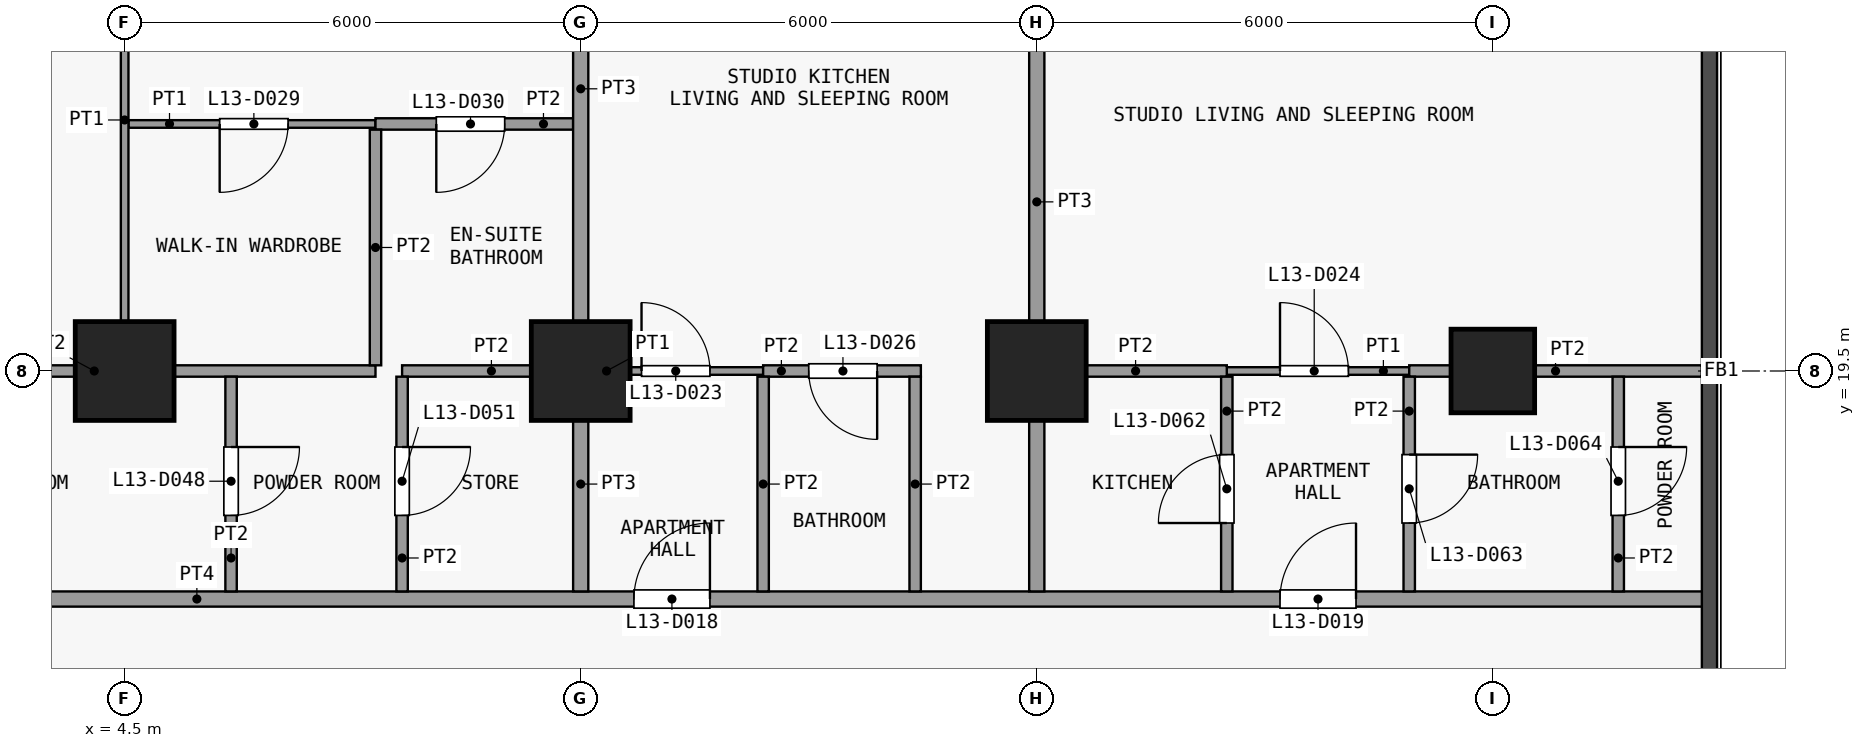
"""IFC4 building model, lengths in metres.
Left out: names, types, materials, properties, quantities, classifications, styles, units other than length and angle.
Written with IfcOpenShell. Run it as: python <this file> out.ifc"""

import sys

from ifc_helpers import new_model, si_unit, direction, frame, frame_2d, origin, origin_2d, place, context, subcontext, project, spatial, rectangle, extrude, element, fill, save


model = new_model("IFC4")
c1 = context("Model", 3, precision=1e-05, world=origin(), true_north=direction((0.0, 1.0)))
c2 = subcontext(c1, "Body", "Model", "MODEL_VIEW")
j1 = project(units=[si_unit("LENGTHUNIT", "METRE"), si_unit("PLANEANGLEUNIT", "RADIAN")], contexts=[c1])
p1 = place(None, origin())
s1 = spatial("IfcSite", under=j1, at=p1, CompositionType="ELEMENT")
p2 = place(p1, origin())
s2 = spatial("IfcBuilding", under=s1, at=p2, CompositionType="ELEMENT")
p3 = place(p2, frame((0.0, 0.0, 57.7)))
s3 = spatial("IfcBuildingStorey", under=s2, at=p3, CompositionType="ELEMENT", Elevation=57.7)
for number, where, z_axis, x_axis in (
    (1, (4.5, 19.5, 0.0), (0.0, 0.0, 1.0), (1.0, 0.0, 0.0)),
    (2, (10.5, 19.5, 0.0), (0.0, 0.0, 1.0), (1.0, 0.0, 0.0)),
    (3, (16.5, 19.5, 0.0), (0.0, 0.0, 1.0), (1.0, 0.0, 0.0)),
):
    element("IfcColumn", number, at=place(p3, frame(where, z_axis=z_axis, x_axis=x_axis)), inside=s3, PredefinedType="COLUMN", context=c2, shape_type="SweptSolid", body=[
        extrude(rectangle(XDim=1.3, YDim=1.3, at=origin_2d()), origin(), (0.0, 0.0, 1.0), 3.6),
    ])
p4 = place(p3, frame((22.5, 19.5, 0.0), z_axis=(0.0, 0.0, 1.0), x_axis=(1.0, 0.0, 0.0)))
e4 = element("IfcColumn", 4, at=p4, inside=s3, PredefinedType="COLUMN", context=c2, shape_type="SweptSolid", body=[
    extrude(rectangle(XDim=1.1, YDim=1.1, at=origin_2d()), origin(), (0.0, 0.0, 1.0), 3.6),
])
p5 = place(p3, frame((-25.35, 16.5, 0.0), z_axis=(0.0, 0.0, 1.0), x_axis=(1.0, 0.0, 0.0)))
e5 = element("IfcWall", 5, at=p5, inside=s3, PredefinedType="PARTITIONING", context=c2, shape_type="SweptSolid", body=[
    extrude(rectangle(XDim=50.7, YDim=0.2, at=frame_2d((25.35, 0.0))), origin(), (0.0, 0.0, 1.0), 3.3),
])
p6 = place(p5, frame((7.05, 0.0, 0.0)))
e6 = element("IfcOpeningElement", 6, at=p6, cuts=e5, PredefinedType="OPENING", context=c2, shape_type="SweptSolid", body=[
    extrude(rectangle(XDim=1.0, YDim=2.1, at=frame_2d((0.5, 1.05))), frame((0.0, 0.11, 0.0), z_axis=(0.0, -1.0, 0.0), x_axis=(1.0, 0.0, 0.0)), (0.0, 0.0, 1.0), 0.22),
])
p7 = place(p5, frame((15.55, 0.0, 0.0)))
e7 = element("IfcOpeningElement", 7, at=p7, cuts=e5, PredefinedType="OPENING", context=c2, shape_type="SweptSolid", body=[
    extrude(rectangle(XDim=1.0, YDim=2.1, at=frame_2d((0.5, 1.05))), frame((0.0, 0.11, 0.0), z_axis=(0.0, -1.0, 0.0), x_axis=(1.0, 0.0, 0.0)), (0.0, 0.0, 1.0), 0.22),
])
p8 = place(p5, frame((24.05, 0.0, 0.0)))
e8 = element("IfcOpeningElement", 8, at=p8, cuts=e5, PredefinedType="OPENING", context=c2, shape_type="SweptSolid", body=[
    extrude(rectangle(XDim=1.0, YDim=2.1, at=frame_2d((0.5, 1.05))), frame((0.0, 0.11, 0.0), z_axis=(0.0, -1.0, 0.0), x_axis=(1.0, 0.0, 0.0)), (0.0, 0.0, 1.0), 0.22),
])
p9 = place(p5, frame((36.55, 0.0, 0.0)))
e9 = element("IfcOpeningElement", 9, at=p9, cuts=e5, PredefinedType="OPENING", context=c2, shape_type="SweptSolid", body=[
    extrude(rectangle(XDim=1.0, YDim=2.1, at=frame_2d((0.5, 1.05))), frame((0.0, 0.11, 0.0), z_axis=(0.0, -1.0, 0.0), x_axis=(1.0, 0.0, 0.0)), (0.0, 0.0, 1.0), 0.22),
])
p10 = place(p5, frame((45.05, 0.0, 0.0)))
e10 = element("IfcOpeningElement", 10, at=p10, cuts=e5, PredefinedType="OPENING", context=c2, shape_type="SweptSolid", body=[
    extrude(rectangle(XDim=1.0, YDim=2.1, at=frame_2d((0.5, 1.05))), frame((0.0, 0.11, 0.0), z_axis=(0.0, -1.0, 0.0), x_axis=(1.0, 0.0, 0.0)), (0.0, 0.0, 1.0), 0.22),
])
p11 = place(p3, frame((10.5, 19.5, 0.0), z_axis=(0.0, 0.0, 1.0), x_axis=(1.0, 0.0, 0.0)))
e11 = element("IfcWall", 11, at=p11, inside=s3, PredefinedType="PARTITIONING", context=c2, shape_type="SweptSolid", body=[
    extrude(rectangle(XDim=2.4, YDim=0.1, at=frame_2d((1.2, 0.0))), origin(), (0.0, 0.0, 1.0), 3.3),
])
p12 = place(p11, frame((0.8, 0.0, 0.0)))
e12 = element("IfcOpeningElement", 12, at=p12, cuts=e11, PredefinedType="OPENING", context=c2, shape_type="SweptSolid", body=[
    extrude(rectangle(XDim=0.9, YDim=2.1, at=frame_2d((0.45, 1.05))), frame((0.0, 0.06, 0.0), z_axis=(0.0, -1.0, 0.0), x_axis=(1.0, 0.0, 0.0)), (0.0, 0.0, 1.0), 0.12),
])
p13 = place(p3, frame((19.0, 19.5, 0.0), z_axis=(0.0, 0.0, 1.0), x_axis=(1.0, 0.0, 0.0)))
e13 = element("IfcWall", 13, at=p13, inside=s3, PredefinedType="PARTITIONING", context=c2, shape_type="SweptSolid", body=[
    extrude(rectangle(XDim=2.4, YDim=0.1, at=frame_2d((1.2, 0.0))), origin(), (0.0, 0.0, 1.0), 3.3),
])
p14 = place(p13, frame((0.7, 0.0, 0.0)))
e14 = element("IfcOpeningElement", 14, at=p14, cuts=e13, PredefinedType="OPENING", context=c2, shape_type="SweptSolid", body=[
    extrude(rectangle(XDim=0.9, YDim=2.1, at=frame_2d((0.45, 1.05))), frame((0.0, 0.06, 0.0), z_axis=(0.0, -1.0, 0.0), x_axis=(1.0, 0.0, 0.0)), (0.0, 0.0, 1.0), 0.12),
])
p15 = place(p3, frame((0.4, 19.5, 0.0), z_axis=(0.0, 0.0, 1.0), x_axis=(1.0, 0.0, 0.0)))
e15 = element("IfcWall", 15, at=p15, inside=s3, PredefinedType="PARTITIONING", context=c2, shape_type="SweptSolid", body=[
    extrude(rectangle(XDim=7.4, YDim=0.15, at=frame_2d((3.7, 0.0))), origin(), (0.0, 0.0, 1.0), 3.3),
])
p16 = place(p3, frame((8.15, 19.5, 0.0), z_axis=(0.0, 0.0, 1.0), x_axis=(1.0, 0.0, 0.0)))
e16 = element("IfcWall", 16, at=p16, inside=s3, PredefinedType="PARTITIONING", context=c2, shape_type="SweptSolid", body=[
    extrude(rectangle(XDim=2.35, YDim=0.15, at=frame_2d((1.175, 0.0))), origin(), (0.0, 0.0, 1.0), 3.3),
])
p17 = place(p3, frame((12.9, 19.5, 0.0), z_axis=(0.0, 0.0, 1.0), x_axis=(1.0, 0.0, 0.0)))
e17 = element("IfcWall", 17, at=p17, inside=s3, PredefinedType="PARTITIONING", context=c2, shape_type="SweptSolid", body=[
    extrude(rectangle(XDim=2.075, YDim=0.15, at=frame_2d((1.038, 0.0))), origin(), (0.0, 0.0, 1.0), 3.3),
])
p18 = place(p17, frame((0.6, 0.0, 0.0)))
e18 = element("IfcOpeningElement", 18, at=p18, cuts=e17, PredefinedType="OPENING", context=c2, shape_type="SweptSolid", body=[
    extrude(rectangle(XDim=0.9, YDim=2.1, at=frame_2d((0.45, 1.05))), frame((0.0, 0.085, 0.0), z_axis=(0.0, -1.0, 0.0), x_axis=(1.0, 0.0, 0.0)), (0.0, 0.0, 1.0), 0.17),
])
p19 = place(p3, frame((16.6, 19.5, 0.0), z_axis=(0.0, 0.0, 1.0), x_axis=(1.0, 0.0, 0.0)))
e19 = element("IfcWall", 19, at=p19, inside=s3, PredefinedType="PARTITIONING", context=c2, shape_type="SweptSolid", body=[
    extrude(rectangle(XDim=2.4, YDim=0.15, at=frame_2d((1.2, 0.0))), origin(), (0.0, 0.0, 1.0), 3.3),
])
p20 = place(p3, frame((21.4, 19.5, 0.0), z_axis=(0.0, 0.0, 1.0), x_axis=(1.0, 0.0, 0.0)))
e20 = element("IfcWall", 20, at=p20, inside=s3, PredefinedType="PARTITIONING", context=c2, shape_type="SweptSolid", body=[
    extrude(rectangle(XDim=3.85, YDim=0.15, at=frame_2d((1.925, 0.0))), origin(), (0.0, 0.0, 1.0), 3.3),
])
p21 = place(p3, frame((4.55, 22.75, 0.0), z_axis=(0.0, 0.0, 1.0), x_axis=(1.0, 0.0, 0.0)))
e21 = element("IfcWall", 21, at=p21, inside=s3, PredefinedType="PARTITIONING", context=c2, shape_type="SweptSolid", body=[
    extrude(rectangle(XDim=3.25, YDim=0.1, at=frame_2d((1.625, 0.0))), origin(), (0.0, 0.0, 1.0), 3.3),
])
p22 = place(p21, frame((1.2, 0.0, 0.0)))
e22 = element("IfcOpeningElement", 22, at=p22, cuts=e21, PredefinedType="OPENING", context=c2, shape_type="SweptSolid", body=[
    extrude(rectangle(XDim=0.9, YDim=2.1, at=frame_2d((0.45, 1.05))), frame((0.0, 0.06, 0.0), z_axis=(0.0, -1.0, 0.0), x_axis=(1.0, 0.0, 0.0)), (0.0, 0.0, 1.0), 0.12),
])
p23 = place(p3, frame((7.8, 22.75, 0.0), z_axis=(0.0, 0.0, 1.0), x_axis=(1.0, 0.0, 0.0)))
e23 = element("IfcWall", 23, at=p23, inside=s3, PredefinedType="PARTITIONING", context=c2, shape_type="SweptSolid", body=[
    extrude(rectangle(XDim=2.6, YDim=0.15, at=frame_2d((1.3, 0.0))), origin(), (0.0, 0.0, 1.0), 3.3),
])
p24 = place(p23, frame((0.8, 0.0, 0.0)))
e24 = element("IfcOpeningElement", 24, at=p24, cuts=e23, PredefinedType="OPENING", context=c2, shape_type="SweptSolid", body=[
    extrude(rectangle(XDim=0.9, YDim=2.1, at=frame_2d((0.45, 1.05))), frame((0.0, 0.085, 0.0), z_axis=(0.0, -1.0, 0.0), x_axis=(1.0, 0.0, 0.0)), (0.0, 0.0, 1.0), 0.17),
])
p25 = place(p3, frame((4.5, 19.575, 0.0), z_axis=(0.0, 0.0, 1.0), x_axis=(0.0, 1.0, 0.0)))
e25 = element("IfcWall", 25, at=p25, inside=s3, PredefinedType="PARTITIONING", context=c2, shape_type="SweptSolid", body=[
    extrude(rectangle(XDim=8.675, YDim=0.1, at=frame_2d((4.337, 0.0))), origin(), (0.0, 0.0, 1.0), 3.3),
])
p26 = place(p25, frame((6.575, 0.0, 0.0)))
e26 = element("IfcOpeningElement", 26, at=p26, cuts=e25, PredefinedType="OPENING", context=c2, shape_type="SweptSolid", body=[
    extrude(rectangle(XDim=0.9, YDim=2.1, at=frame_2d((0.45, 1.05))), frame((0.0, 0.06, 0.0), z_axis=(0.0, -1.0, 0.0), x_axis=(1.0, 0.0, 0.0)), (0.0, 0.0, 1.0), 0.12),
])
p27 = place(p3, frame((5.9, 16.6, 0.0), z_axis=(0.0, 0.0, 1.0), x_axis=(0.0, 1.0, 0.0)))
e27 = element("IfcWall", 27, at=p27, inside=s3, PredefinedType="PARTITIONING", context=c2, shape_type="SweptSolid", body=[
    extrude(rectangle(XDim=2.825, YDim=0.15, at=frame_2d((1.413, 0.0))), origin(), (0.0, 0.0, 1.0), 3.3),
])
p28 = place(p27, frame((1.0, 0.0, 0.0)))
e28 = element("IfcOpeningElement", 28, at=p28, cuts=e27, PredefinedType="OPENING", context=c2, shape_type="SweptSolid", body=[
    extrude(rectangle(XDim=0.9, YDim=2.1, at=frame_2d((0.45, 1.05))), frame((0.0, 0.085, 0.0), z_axis=(0.0, -1.0, 0.0), x_axis=(1.0, 0.0, 0.0)), (0.0, 0.0, 1.0), 0.17),
])
p29 = place(p3, frame((7.8, 19.575, 0.0), z_axis=(0.0, 0.0, 1.0), x_axis=(0.0, 1.0, 0.0)))
e29 = element("IfcWall", 29, at=p29, inside=s3, PredefinedType="PARTITIONING", context=c2, shape_type="SweptSolid", body=[
    extrude(rectangle(XDim=3.1, YDim=0.15, at=frame_2d((1.55, 0.0))), origin(), (0.0, 0.0, 1.0), 3.3),
])
p30 = place(p3, frame((8.15, 16.6, 0.0), z_axis=(0.0, 0.0, 1.0), x_axis=(0.0, 1.0, 0.0)))
e30 = element("IfcWall", 30, at=p30, inside=s3, PredefinedType="PARTITIONING", context=c2, shape_type="SweptSolid", body=[
    extrude(rectangle(XDim=2.825, YDim=0.15, at=frame_2d((1.413, 0.0))), origin(), (0.0, 0.0, 1.0), 3.3),
])
p31 = place(p30, frame((1.0, 0.0, 0.0)))
e31 = element("IfcOpeningElement", 31, at=p31, cuts=e30, PredefinedType="OPENING", context=c2, shape_type="SweptSolid", body=[
    extrude(rectangle(XDim=0.9, YDim=2.1, at=frame_2d((0.45, 1.05))), frame((0.0, 0.085, 0.0), z_axis=(0.0, -1.0, 0.0), x_axis=(1.0, 0.0, 0.0)), (0.0, 0.0, 1.0), 0.17),
])
p32 = place(p3, frame((10.5, 16.6, 0.0), z_axis=(0.0, 0.0, 1.0), x_axis=(0.0, 1.0, 0.0)))
e32 = element("IfcWall", 32, at=p32, inside=s3, PredefinedType="PARTITIONING", context=c2, shape_type="SweptSolid", body=[
    extrude(rectangle(XDim=2.825, YDim=0.2, at=frame_2d((1.413, 0.0))), origin(), (0.0, 0.0, 1.0), 3.3),
])
p33 = place(p3, frame((10.5, 19.575, 0.0), z_axis=(0.0, 0.0, 1.0), x_axis=(0.0, 1.0, 0.0)))
e33 = element("IfcWall", 33, at=p33, inside=s3, PredefinedType="PARTITIONING", context=c2, shape_type="SweptSolid", body=[
    extrude(rectangle(XDim=7.275, YDim=0.2, at=frame_2d((3.638, 0.0))), origin(), (0.0, 0.0, 1.0), 3.3),
])
for number, where, z_axis, x_axis in (
    (34, (12.9, 16.6, 0.0), (0.0, 0.0, 1.0), (0.0, 1.0, 0.0)),
    (35, (14.9, 16.6, 0.0), (0.0, 0.0, 1.0), (0.0, 1.0, 0.0)),
):
    element("IfcWall", number, at=place(p3, frame(where, z_axis=z_axis, x_axis=x_axis)), inside=s3, PredefinedType="PARTITIONING", context=c2, shape_type="SweptSolid", body=[
        extrude(rectangle(XDim=2.825, YDim=0.15, at=frame_2d((1.413, 0.0))), origin(), (0.0, 0.0, 1.0), 3.3),
    ])
p34 = place(p3, frame((16.5, 16.6, 0.0), z_axis=(0.0, 0.0, 1.0), x_axis=(0.0, 1.0, 0.0)))
e36 = element("IfcWall", 36, at=p34, inside=s3, PredefinedType="PARTITIONING", context=c2, shape_type="SweptSolid", body=[
    extrude(rectangle(XDim=10.25, YDim=0.2, at=frame_2d((5.125, 0.0))), origin(), (0.0, 0.0, 1.0), 3.3),
])
p35 = place(p3, frame((19.0, 16.6, 0.0), z_axis=(0.0, 0.0, 1.0), x_axis=(0.0, 1.0, 0.0)))
e37 = element("IfcWall", 37, at=p35, inside=s3, PredefinedType="PARTITIONING", context=c2, shape_type="SweptSolid", body=[
    extrude(rectangle(XDim=2.825, YDim=0.15, at=frame_2d((1.413, 0.0))), origin(), (0.0, 0.0, 1.0), 3.3),
])
p36 = place(p35, frame((0.9, 0.0, 0.0)))
e38 = element("IfcOpeningElement", 38, at=p36, cuts=e37, PredefinedType="OPENING", context=c2, shape_type="SweptSolid", body=[
    extrude(rectangle(XDim=0.9, YDim=2.1, at=frame_2d((0.45, 1.05))), frame((0.0, 0.085, 0.0), z_axis=(0.0, -1.0, 0.0), x_axis=(1.0, 0.0, 0.0)), (0.0, 0.0, 1.0), 0.17),
])
p37 = place(p3, frame((21.4, 16.6, 0.0), z_axis=(0.0, 0.0, 1.0), x_axis=(0.0, 1.0, 0.0)))
e39 = element("IfcWall", 39, at=p37, inside=s3, PredefinedType="PARTITIONING", context=c2, shape_type="SweptSolid", body=[
    extrude(rectangle(XDim=2.825, YDim=0.15, at=frame_2d((1.413, 0.0))), origin(), (0.0, 0.0, 1.0), 3.3),
])
p38 = place(p37, frame((0.9, 0.0, 0.0)))
e40 = element("IfcOpeningElement", 40, at=p38, cuts=e39, PredefinedType="OPENING", context=c2, shape_type="SweptSolid", body=[
    extrude(rectangle(XDim=0.9, YDim=2.1, at=frame_2d((0.45, 1.05))), frame((0.0, 0.085, 0.0), z_axis=(0.0, -1.0, 0.0), x_axis=(1.0, 0.0, 0.0)), (0.0, 0.0, 1.0), 0.17),
])
p39 = place(p3, frame((24.15, 16.6, 0.0), z_axis=(0.0, 0.0, 1.0), x_axis=(0.0, 1.0, 0.0)))
e41 = element("IfcWall", 41, at=p39, inside=s3, PredefinedType="PARTITIONING", context=c2, shape_type="SweptSolid", body=[
    extrude(rectangle(XDim=2.825, YDim=0.15, at=frame_2d((1.413, 0.0))), origin(), (0.0, 0.0, 1.0), 3.3),
])
p40 = place(p39, frame((1.0, 0.0, 0.0)))
e42 = element("IfcOpeningElement", 42, at=p40, cuts=e41, PredefinedType="OPENING", context=c2, shape_type="SweptSolid", body=[
    extrude(rectangle(XDim=0.9, YDim=2.1, at=frame_2d((0.45, 1.05))), frame((0.0, 0.085, 0.0), z_axis=(0.0, -1.0, 0.0), x_axis=(1.0, 0.0, 0.0)), (0.0, 0.0, 1.0), 0.17),
])
p41 = place(p9, origin())
e43 = element("IfcDoor", 43, at=p41, inside=s3, OperationType="SINGLE_SWING_LEFT", PredefinedType="DOOR", context=c2, shape_type="SweptSolid", body=[
    extrude(rectangle(XDim=1.0, YDim=2.1, at=frame_2d((0.5, 1.05))), frame((0.0, 0.025, 0.0), z_axis=(0.0, -1.0, 0.0), x_axis=(1.0, 0.0, 0.0)), (0.0, 0.0, 1.0), 0.05),
])
fill(e9, e43)
p42 = place(p10, origin())
e44 = element("IfcDoor", 44, at=p42, inside=s3, OperationType="SINGLE_SWING_LEFT", PredefinedType="DOOR", context=c2, shape_type="SweptSolid", body=[
    extrude(rectangle(XDim=1.0, YDim=2.1, at=frame_2d((0.5, 1.05))), frame((0.0, 0.025, 0.0), z_axis=(0.0, -1.0, 0.0), x_axis=(1.0, 0.0, 0.0)), (0.0, 0.0, 1.0), 0.05),
])
fill(e10, e44)
p43 = place(p12, origin())
e45 = element("IfcDoor", 45, at=p43, inside=s3, OperationType="SINGLE_SWING_RIGHT", PredefinedType="DOOR", context=c2, shape_type="SweptSolid", body=[
    extrude(rectangle(XDim=0.9, YDim=2.1, at=frame_2d((0.45, 1.05))), frame((0.0, 0.025, 0.0), z_axis=(0.0, -1.0, 0.0), x_axis=(1.0, 0.0, 0.0)), (0.0, 0.0, 1.0), 0.05),
])
fill(e12, e45)
p44 = place(p14, origin())
e46 = element("IfcDoor", 46, at=p44, inside=s3, OperationType="SINGLE_SWING_RIGHT", PredefinedType="DOOR", context=c2, shape_type="SweptSolid", body=[
    extrude(rectangle(XDim=0.9, YDim=2.1, at=frame_2d((0.45, 1.05))), frame((0.0, 0.025, 0.0), z_axis=(0.0, -1.0, 0.0), x_axis=(1.0, 0.0, 0.0)), (0.0, 0.0, 1.0), 0.05),
])
fill(e14, e46)
p45 = place(p18, origin())
e47 = element("IfcDoor", 47, at=p45, inside=s3, OperationType="SINGLE_SWING_RIGHT", PredefinedType="DOOR", context=c2, shape_type="SweptSolid", body=[
    extrude(rectangle(XDim=0.9, YDim=2.1, at=frame_2d((0.45, 1.05))), frame((0.0, 0.025, 0.0), z_axis=(0.0, -1.0, 0.0), x_axis=(1.0, 0.0, 0.0)), (0.0, 0.0, 1.0), 0.05),
])
fill(e18, e47)
p46 = place(p22, origin())
e48 = element("IfcDoor", 48, at=p46, inside=s3, OperationType="SINGLE_SWING_LEFT", PredefinedType="DOOR", context=c2, shape_type="SweptSolid", body=[
    extrude(rectangle(XDim=0.9, YDim=2.1, at=frame_2d((0.45, 1.05))), frame((0.0, 0.025, 0.0), z_axis=(0.0, -1.0, 0.0), x_axis=(1.0, 0.0, 0.0)), (0.0, 0.0, 1.0), 0.05),
])
fill(e22, e48)
p47 = place(p24, origin())
e49 = element("IfcDoor", 49, at=p47, inside=s3, OperationType="SINGLE_SWING_LEFT", PredefinedType="DOOR", context=c2, shape_type="SweptSolid", body=[
    extrude(rectangle(XDim=0.9, YDim=2.1, at=frame_2d((0.45, 1.05))), frame((0.0, 0.025, 0.0), z_axis=(0.0, -1.0, 0.0), x_axis=(1.0, 0.0, 0.0)), (0.0, 0.0, 1.0), 0.05),
])
fill(e24, e49)
p48 = place(p28, origin())
e50 = element("IfcDoor", 50, at=p48, inside=s3, OperationType="SINGLE_SWING_RIGHT", PredefinedType="DOOR", context=c2, shape_type="SweptSolid", body=[
    extrude(rectangle(XDim=0.9, YDim=2.1, at=frame_2d((0.45, 1.05))), frame((0.0, 0.025, 0.0), z_axis=(0.0, -1.0, 0.0), x_axis=(1.0, 0.0, 0.0)), (0.0, 0.0, 1.0), 0.05),
])
fill(e28, e50)
p49 = place(p31, origin())
e51 = element("IfcDoor", 51, at=p49, inside=s3, OperationType="SINGLE_SWING_RIGHT", PredefinedType="DOOR", context=c2, shape_type="SweptSolid", body=[
    extrude(rectangle(XDim=0.9, YDim=2.1, at=frame_2d((0.45, 1.05))), frame((0.0, 0.025, 0.0), z_axis=(0.0, -1.0, 0.0), x_axis=(1.0, 0.0, 0.0)), (0.0, 0.0, 1.0), 0.05),
])
fill(e31, e51)
p50 = place(p36, origin())
e52 = element("IfcDoor", 52, at=p50, inside=s3, OperationType="SINGLE_SWING_RIGHT", PredefinedType="DOOR", context=c2, shape_type="SweptSolid", body=[
    extrude(rectangle(XDim=0.9, YDim=2.1, at=frame_2d((0.45, 1.05))), frame((0.0, 0.025, 0.0), z_axis=(0.0, -1.0, 0.0), x_axis=(1.0, 0.0, 0.0)), (0.0, 0.0, 1.0), 0.05),
])
fill(e38, e52)
p51 = place(p38, origin())
e53 = element("IfcDoor", 53, at=p51, inside=s3, OperationType="SINGLE_SWING_RIGHT", PredefinedType="DOOR", context=c2, shape_type="SweptSolid", body=[
    extrude(rectangle(XDim=0.9, YDim=2.1, at=frame_2d((0.45, 1.05))), frame((0.0, 0.025, 0.0), z_axis=(0.0, -1.0, 0.0), x_axis=(1.0, 0.0, 0.0)), (0.0, 0.0, 1.0), 0.05),
])
fill(e40, e53)
p52 = place(p40, origin())
e54 = element("IfcDoor", 54, at=p52, inside=s3, OperationType="SINGLE_SWING_RIGHT", PredefinedType="DOOR", context=c2, shape_type="SweptSolid", body=[
    extrude(rectangle(XDim=0.9, YDim=2.1, at=frame_2d((0.45, 1.05))), frame((0.0, 0.025, 0.0), z_axis=(0.0, -1.0, 0.0), x_axis=(1.0, 0.0, 0.0)), (0.0, 0.0, 1.0), 0.05),
])
fill(e42, e54)
save(model, sys.argv[1])
